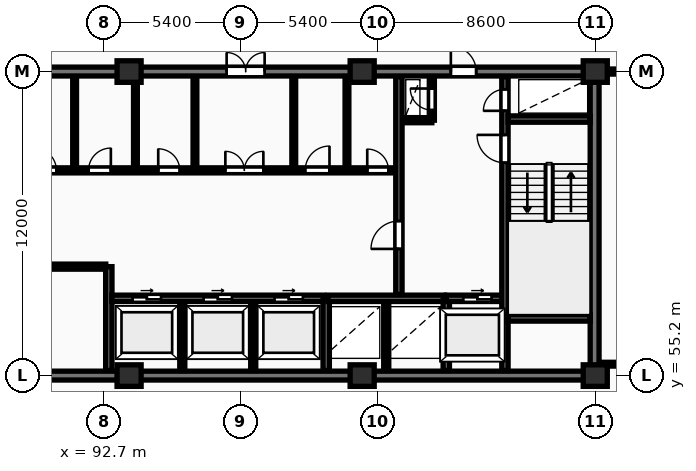
"""IFC4 building model, lengths in metres.
Left out: names, types, materials, properties, quantities, classifications, styles, units other than length and angle.
Written with IfcOpenShell. Run it as: python <this file> out.ifc"""

import sys

from ifc_helpers import new_model, si_unit, direction, frame, frame_2d, origin, origin_2d, place, context, subcontext, project, spatial, rectangle, extrude, element, fill, save


model = new_model("IFC4")
c1 = context("Model", 3, precision=1e-05, world=origin(), true_north=direction((0.0, 1.0)))
c2 = subcontext(c1, "Body", "Model", "MODEL_VIEW")
j1 = project(units=[si_unit("LENGTHUNIT", "METRE"), si_unit("PLANEANGLEUNIT", "RADIAN")], contexts=[c1])
p1 = place(None, origin())
s1 = spatial("IfcSite", under=j1, at=p1, CompositionType="ELEMENT")
p2 = place(p1, origin())
s2 = spatial("IfcBuilding", under=s1, at=p2, CompositionType="ELEMENT")
p3 = place(p2, frame((0.0, 0.0, 100.3)))
s3 = spatial("IfcBuildingStorey", under=s2, at=p3, CompositionType="ELEMENT", Elevation=100.3)
for number, where, z_axis, x_axis in (
    (1, (93.7, 55.2, 0.0), (0.0, 0.0, 1.0), (1.0, 0.0, 0.0)),
    (2, (93.7, 67.2, 0.0), (0.0, 0.0, 1.0), (1.0, 0.0, 0.0)),
    (3, (102.9, 55.2, 0.0), (0.0, 0.0, 1.0), (1.0, 0.0, 0.0)),
    (4, (102.9, 67.2, 0.0), (0.0, 0.0, 1.0), (1.0, 0.0, 0.0)),
    (5, (112.1, 55.2, 0.0), (0.0, 0.0, 1.0), (1.0, 0.0, 0.0)),
    (6, (112.1, 67.2, 0.0), (0.0, 0.0, 1.0), (1.0, 0.0, 0.0)),
):
    element("IfcColumn", number, at=place(p3, frame(where, z_axis=z_axis, x_axis=x_axis)), inside=s3, PredefinedType="COLUMN", context=c2, shape_type="SweptSolid", body=[
        extrude(rectangle(XDim=0.95, YDim=0.85, at=origin_2d()), origin(), (0.0, 0.0, 1.0), 3.25),
    ])
p4 = place(p3, frame((75.95, 55.2, 0.0), z_axis=(0.0, 0.0, 1.0), x_axis=(1.0, 0.0, 0.0)))
e7 = element("IfcWall", 7, at=p4, inside=s3, PredefinedType="SHEAR", context=c2, shape_type="SweptSolid", body=[
    extrude(rectangle(XDim=36.3, YDim=0.35, at=frame_2d((18.15, 0.0))), origin(), (0.0, 0.0, 1.0), 3.25),
])
p5 = place(p3, frame((112.075, 55.375, 0.0), z_axis=(0.0, 0.0, 1.0), x_axis=(0.0, 1.0, 0.0)))
e8 = element("IfcWall", 8, at=p5, inside=s3, PredefinedType="SHEAR", context=c2, shape_type="SweptSolid", body=[
    extrude(rectangle(XDim=11.65, YDim=0.35, at=frame_2d((5.825, 0.0))), origin(), (0.0, 0.0, 1.0), 3.25),
])
p6 = place(p3, frame((75.95, 67.2, 0.0), z_axis=(0.0, 0.0, 1.0), x_axis=(1.0, 0.0, 0.0)))
e9 = element("IfcWall", 9, at=p6, inside=s3, PredefinedType="SHEAR", context=c2, shape_type="SweptSolid", body=[
    extrude(rectangle(XDim=36.3, YDim=0.35, at=frame_2d((18.15, 0.0))), origin(), (0.0, 0.0, 1.0), 3.25),
])
p7 = place(p6, frame((5.25, 0.0, 0.0)))
e10 = element("IfcOpeningElement", 10, at=p7, cuts=e9, PredefinedType="OPENING", context=c2, shape_type="SweptSolid", body=[
    extrude(rectangle(XDim=1.0, YDim=2.15, at=frame_2d((0.5, 1.075))), frame((0.0, 0.185, 0.0), z_axis=(0.0, -1.0, 0.0), x_axis=(1.0, 0.0, 0.0)), (0.0, 0.0, 1.0), 0.37),
])
p8 = place(p6, frame((21.6, 0.0, 0.0)))
e11 = element("IfcOpeningElement", 11, at=p8, cuts=e9, PredefinedType="OPENING", context=c2, shape_type="SweptSolid", body=[
    extrude(rectangle(XDim=1.5, YDim=2.2, at=frame_2d((0.75, 1.1))), frame((0.0, 0.185, 0.0), z_axis=(0.0, -1.0, 0.0), x_axis=(1.0, 0.0, 0.0)), (0.0, 0.0, 1.0), 0.37),
])
p9 = place(p6, frame((30.45, 0.0, 0.0)))
e12 = element("IfcOpeningElement", 12, at=p9, cuts=e9, PredefinedType="OPENING", context=c2, shape_type="SweptSolid", body=[
    extrude(rectangle(XDim=1.0, YDim=2.15, at=frame_2d((0.5, 1.075))), frame((0.0, 0.185, 0.0), z_axis=(0.0, -1.0, 0.0), x_axis=(1.0, 0.0, 0.0)), (0.0, 0.0, 1.0), 0.37),
])
p10 = place(p3, frame((84.42, 59.5, 0.0), z_axis=(0.0, 0.0, 1.0), x_axis=(1.0, 0.0, 0.0)))
e13 = element("IfcWall", 13, at=p10, inside=s3, PredefinedType="PARTITIONING", context=c2, shape_type="SweptSolid", body=[
    extrude(rectangle(XDim=8.36, YDim=0.2, at=frame_2d((4.18, 0.0))), origin(), (0.0, 0.0, 1.0), 2.97),
])
p11 = place(p10, frame((3.4, 0.0, 0.0)))
e14 = element("IfcOpeningElement", 14, at=p11, cuts=e13, PredefinedType="OPENING", context=c2, shape_type="SweptSolid", body=[
    extrude(rectangle(XDim=0.92, YDim=2.08, at=frame_2d((0.46, 1.04))), frame((0.0, 0.11, 0.0), z_axis=(0.0, -1.0, 0.0), x_axis=(1.0, 0.0, 0.0)), (0.0, 0.0, 1.0), 0.22),
])
p12 = place(p3, frame((92.9, 55.4, 0.0), z_axis=(0.0, 0.0, 1.0), x_axis=(0.0, 1.0, 0.0)))
e15 = element("IfcWall", 15, at=p12, inside=s3, PredefinedType="SHEAR", context=c2, shape_type="SweptSolid", body=[
    extrude(rectangle(XDim=4.1, YDim=0.25, at=frame_2d((2.05, 0.0))), origin(), (0.0, 0.0, 1.0), 3.25),
])
for number, where, z_axis, x_axis in (
    (16, (95.8, 55.4, 0.0), (0.0, 0.0, 1.0), (0.0, 1.0, 0.0)),
    (17, (98.6, 55.4, 0.0), (0.0, 0.0, 1.0), (0.0, 1.0, 0.0)),
):
    element("IfcWall", number, at=place(p3, frame(where, z_axis=z_axis, x_axis=x_axis)), inside=s3, PredefinedType="PARTITIONING", context=c2, shape_type="SweptSolid", body=[
        extrude(rectangle(XDim=2.72, YDim=0.2, at=frame_2d((1.36, 0.0))), origin(), (0.0, 0.0, 1.0), 2.97),
    ])
p13 = place(p3, frame((93.02, 58.25, 0.0), z_axis=(0.0, 0.0, 1.0), x_axis=(1.0, 0.0, 0.0)))
e18 = element("IfcWall", 18, at=p13, inside=s3, PredefinedType="SHEAR", context=c2, shape_type="SweptSolid", body=[
    extrude(rectangle(XDim=8.36, YDim=0.25, at=frame_2d((4.18, 0.0))), origin(), (0.0, 0.0, 1.0), 3.25),
])
p14 = place(p13, frame((0.82, 0.0, 0.0)))
e19 = element("IfcOpeningElement", 19, at=p14, cuts=e18, PredefinedType="OPENING", context=c2, shape_type="SweptSolid", body=[
    extrude(rectangle(XDim=1.12, YDim=2.12, at=frame_2d((0.56, 1.06))), frame((0.0, 0.135, 0.0), z_axis=(0.0, -1.0, 0.0), x_axis=(1.0, 0.0, 0.0)), (0.0, 0.0, 1.0), 0.27),
])
p15 = place(p13, frame((3.62, 0.0, 0.0)))
e20 = element("IfcOpeningElement", 20, at=p15, cuts=e18, PredefinedType="OPENING", context=c2, shape_type="SweptSolid", body=[
    extrude(rectangle(XDim=1.12, YDim=2.12, at=frame_2d((0.56, 1.06))), frame((0.0, 0.135, 0.0), z_axis=(0.0, -1.0, 0.0), x_axis=(1.0, 0.0, 0.0)), (0.0, 0.0, 1.0), 0.27),
])
p16 = place(p13, frame((6.42, 0.0, 0.0)))
e21 = element("IfcOpeningElement", 21, at=p16, cuts=e18, PredefinedType="OPENING", context=c2, shape_type="SweptSolid", body=[
    extrude(rectangle(XDim=1.12, YDim=2.12, at=frame_2d((0.56, 1.06))), frame((0.0, 0.135, 0.0), z_axis=(0.0, -1.0, 0.0), x_axis=(1.0, 0.0, 0.0)), (0.0, 0.0, 1.0), 0.27),
])
p17 = place(p3, frame((101.48, 55.4, 0.0), z_axis=(0.0, 0.0, 1.0), x_axis=(0.0, 1.0, 0.0)))
e22 = element("IfcWall", 22, at=p17, inside=s3, PredefinedType="SHEAR", context=c2, shape_type="SweptSolid", body=[
    extrude(rectangle(XDim=2.85, YDim=0.25, at=frame_2d((1.425, 0.0))), origin(), (0.0, 0.0, 1.0), 3.25),
])
p18 = place(p3, frame((103.85, 55.4, 0.0), z_axis=(0.0, 0.0, 1.0), x_axis=(0.0, 1.0, 0.0)))
e23 = element("IfcWall", 23, at=p18, inside=s3, PredefinedType="PARTITIONING", context=c2, shape_type="SweptSolid", body=[
    extrude(rectangle(XDim=2.72, YDim=0.2, at=frame_2d((1.36, 0.0))), origin(), (0.0, 0.0, 1.0), 2.97),
])
p19 = place(p3, frame((101.55, 58.25, 0.0), z_axis=(0.0, 0.0, 1.0), x_axis=(1.0, 0.0, 0.0)))
e24 = element("IfcWall", 24, at=p19, inside=s3, PredefinedType="SHEAR", context=c2, shape_type="SweptSolid", body=[
    extrude(rectangle(XDim=4.6, YDim=0.25, at=frame_2d((2.3, 0.0))), origin(), (0.0, 0.0, 1.0), 3.25),
])
p20 = place(p3, frame((106.22, 55.4, 0.0), z_axis=(0.0, 0.0, 1.0), x_axis=(0.0, 1.0, 0.0)))
e25 = element("IfcWall", 25, at=p20, inside=s3, PredefinedType="SHEAR", context=c2, shape_type="SweptSolid", body=[
    extrude(rectangle(XDim=2.85, YDim=0.25, at=frame_2d((1.425, 0.0))), origin(), (0.0, 0.0, 1.0), 3.25),
])
p21 = place(p3, frame((106.22, 58.25, 0.0), z_axis=(0.0, 0.0, 1.0), x_axis=(1.0, 0.0, 0.0)))
e26 = element("IfcWall", 26, at=p21, inside=s3, PredefinedType="SHEAR", context=c2, shape_type="SweptSolid", body=[
    extrude(rectangle(XDim=2.46, YDim=0.25, at=frame_2d((1.23, 0.0))), origin(), (0.0, 0.0, 1.0), 3.25),
])
p22 = place(p21, frame((0.67, 0.0, 0.0)))
e27 = element("IfcOpeningElement", 27, at=p22, cuts=e26, PredefinedType="OPENING", context=c2, shape_type="SweptSolid", body=[
    extrude(rectangle(XDim=1.12, YDim=2.12, at=frame_2d((0.56, 1.06))), frame((0.0, 0.135, 0.0), z_axis=(0.0, -1.0, 0.0), x_axis=(1.0, 0.0, 0.0)), (0.0, 0.0, 1.0), 0.27),
])
p23 = place(p3, frame((91.55, 63.4, 0.0), z_axis=(0.0, 0.0, 1.0), x_axis=(0.0, 1.0, 0.0)))
e28 = element("IfcWall", 28, at=p23, inside=s3, PredefinedType="PARTITIONING", context=c2, shape_type="SweptSolid", body=[
    extrude(rectangle(XDim=3.6, YDim=0.15, at=frame_2d((1.8, 0.0))), origin(), (0.0, 0.0, 1.0), 2.97),
])
p24 = place(p3, frame((93.95, 63.4, 0.0), z_axis=(0.0, 0.0, 1.0), x_axis=(0.0, 1.0, 0.0)))
e29 = element("IfcWall", 29, at=p24, inside=s3, PredefinedType="PARTITIONING", context=c2, shape_type="SweptSolid", body=[
    extrude(rectangle(XDim=3.6, YDim=0.15, at=frame_2d((1.8, 0.0))), origin(), (0.0, 0.0, 1.0), 2.277),
])
for number, where, z_axis, x_axis in (
    (30, (102.3, 63.4, 0.0), (0.0, 0.0, 1.0), (0.0, 1.0, 0.0)),
    (31, (96.3, 63.4, 0.0), (0.0, 0.0, 1.0), (0.0, 1.0, 0.0)),
    (32, (100.2, 63.4, 0.0), (0.0, 0.0, 1.0), (0.0, 1.0, 0.0)),
):
    element("IfcWall", number, at=place(p3, frame(where, z_axis=z_axis, x_axis=x_axis)), inside=s3, PredefinedType="PARTITIONING", context=c2, shape_type="SweptSolid", body=[
        extrude(rectangle(XDim=3.6, YDim=0.15, at=frame_2d((1.8, 0.0))), origin(), (0.0, 0.0, 1.0), 2.97),
    ])
p25 = place(p3, frame((84.42, 63.3, 0.0), z_axis=(0.0, 0.0, 1.0), x_axis=(1.0, 0.0, 0.0)))
e33 = element("IfcWall", 33, at=p25, inside=s3, PredefinedType="PARTITIONING", context=c2, shape_type="SweptSolid", body=[
    extrude(rectangle(XDim=19.83, YDim=0.2, at=frame_2d((9.915, 0.0))), origin(), (0.0, 0.0, 1.0), 2.97),
])
p26 = place(p25, frame((1.15, 0.0, 0.0)))
e34 = element("IfcOpeningElement", 34, at=p26, cuts=e33, PredefinedType="OPENING", context=c2, shape_type="SweptSolid", body=[
    extrude(rectangle(XDim=0.85, YDim=2.05, at=frame_2d((0.425, 1.025))), frame((0.0, 0.11, 0.0), z_axis=(0.0, -1.0, 0.0), x_axis=(1.0, 0.0, 0.0)), (0.0, 0.0, 1.0), 0.22),
])
p27 = place(p25, frame((3.25, 0.0, 0.0)))
e35 = element("IfcOpeningElement", 35, at=p27, cuts=e33, PredefinedType="OPENING", context=c2, shape_type="SweptSolid", body=[
    extrude(rectangle(XDim=0.85, YDim=2.05, at=frame_2d((0.425, 1.025))), frame((0.0, 0.11, 0.0), z_axis=(0.0, -1.0, 0.0), x_axis=(1.0, 0.0, 0.0)), (0.0, 0.0, 1.0), 0.22),
])
p28 = place(p25, frame((13.08, 0.0, 0.0)))
e36 = element("IfcOpeningElement", 36, at=p28, cuts=e33, PredefinedType="OPENING", context=c2, shape_type="SweptSolid", body=[
    extrude(rectangle(XDim=1.5, YDim=2.2, at=frame_2d((0.75, 1.1))), frame((0.0, 0.11, 0.0), z_axis=(0.0, -1.0, 0.0), x_axis=(1.0, 0.0, 0.0)), (0.0, 0.0, 1.0), 0.22),
])
p29 = place(p25, frame((5.53, 0.0, 0.0)))
e37 = element("IfcOpeningElement", 37, at=p29, cuts=e33, PredefinedType="OPENING", context=c2, shape_type="SweptSolid", body=[
    extrude(rectangle(XDim=0.88, YDim=2.06, at=frame_2d((0.44, 1.03))), frame((0.0, 0.11, 0.0), z_axis=(0.0, -1.0, 0.0), x_axis=(1.0, 0.0, 0.0)), (0.0, 0.0, 1.0), 0.22),
])
p30 = place(p25, frame((7.68, 0.0, 0.0)))
e38 = element("IfcOpeningElement", 38, at=p30, cuts=e33, PredefinedType="OPENING", context=c2, shape_type="SweptSolid", body=[
    extrude(rectangle(XDim=0.88, YDim=2.06, at=frame_2d((0.44, 1.03))), frame((0.0, 0.11, 0.0), z_axis=(0.0, -1.0, 0.0), x_axis=(1.0, 0.0, 0.0)), (0.0, 0.0, 1.0), 0.22),
])
p31 = place(p25, frame((10.43, 0.0, 0.0)))
e39 = element("IfcOpeningElement", 39, at=p31, cuts=e33, PredefinedType="OPENING", context=c2, shape_type="SweptSolid", body=[
    extrude(rectangle(XDim=0.85, YDim=2.05, at=frame_2d((0.425, 1.025))), frame((0.0, 0.11, 0.0), z_axis=(0.0, -1.0, 0.0), x_axis=(1.0, 0.0, 0.0)), (0.0, 0.0, 1.0), 0.22),
])
p32 = place(p25, frame((16.23, 0.0, 0.0)))
e40 = element("IfcOpeningElement", 40, at=p32, cuts=e33, PredefinedType="OPENING", context=c2, shape_type="SweptSolid", body=[
    extrude(rectangle(XDim=0.96, YDim=2.1, at=frame_2d((0.48, 1.05))), frame((0.0, 0.11, 0.0), z_axis=(0.0, -1.0, 0.0), x_axis=(1.0, 0.0, 0.0)), (0.0, 0.0, 1.0), 0.22),
])
p33 = place(p25, frame((18.68, 0.0, 0.0)))
e41 = element("IfcOpeningElement", 41, at=p33, cuts=e33, PredefinedType="OPENING", context=c2, shape_type="SweptSolid", body=[
    extrude(rectangle(XDim=0.84, YDim=2.04, at=frame_2d((0.42, 1.02))), frame((0.0, 0.11, 0.0), z_axis=(0.0, -1.0, 0.0), x_axis=(1.0, 0.0, 0.0)), (0.0, 0.0, 1.0), 0.22),
])
p34 = place(p3, frame((104.45, 65.28, 0.0), z_axis=(0.0, 0.0, 1.0), x_axis=(1.0, 0.0, 0.0)))
e42 = element("IfcWall", 42, at=p34, inside=s3, PredefinedType="PARTITIONING", context=c2, shape_type="SweptSolid", body=[
    extrude(rectangle(XDim=1.2, YDim=0.2, at=frame_2d((0.6, 0.0))), origin(), (0.0, 0.0, 1.0), 2.97),
])
p35 = place(p3, frame((105.65, 65.28, 0.0), z_axis=(0.0, 0.0, 1.0), x_axis=(0.0, 1.0, 0.0)))
e43 = element("IfcWall", 43, at=p35, inside=s3, PredefinedType="PARTITIONING", context=c2, shape_type="SweptSolid", body=[
    extrude(rectangle(XDim=1.72, YDim=0.2, at=frame_2d((0.86, 0.0))), origin(), (0.0, 0.0, 1.0), 2.97),
])
p36 = place(p35, frame((0.4, 0.0, 0.0)))
e44 = element("IfcOpeningElement", 44, at=p36, cuts=e43, PredefinedType="OPENING", context=c2, shape_type="SweptSolid", body=[
    extrude(rectangle(XDim=0.85, YDim=2.05, at=frame_2d((0.425, 1.025))), frame((0.0, 0.11, 0.0), z_axis=(0.0, -1.0, 0.0), x_axis=(1.0, 0.0, 0.0)), (0.0, 0.0, 1.0), 0.22),
])
p37 = place(p3, frame((104.35, 58.4, 0.0), z_axis=(0.0, 0.0, 1.0), x_axis=(0.0, 1.0, 0.0)))
e45 = element("IfcWall", 45, at=p37, inside=s3, PredefinedType="SHEAR", context=c2, shape_type="SweptSolid", body=[
    extrude(rectangle(XDim=8.6, YDim=0.25, at=frame_2d((4.3, 0.0))), origin(), (0.0, 0.0, 1.0), 3.25),
])
p38 = place(p37, frame((1.8, 0.0, 0.0)))
e46 = element("IfcOpeningElement", 46, at=p38, cuts=e45, PredefinedType="OPENING", context=c2, shape_type="SweptSolid", body=[
    extrude(rectangle(XDim=1.1, YDim=2.1, at=frame_2d((0.55, 1.05))), frame((0.0, 0.135, 0.0), z_axis=(0.0, -1.0, 0.0), x_axis=(1.0, 0.0, 0.0)), (0.0, 0.0, 1.0), 0.27),
])
p39 = place(p3, frame((108.535, 55.4, 0.0), z_axis=(0.0, 0.0, 1.0), x_axis=(0.0, 1.0, 0.0)))
e47 = element("IfcWall", 47, at=p39, inside=s3, PredefinedType="SHEAR", context=c2, shape_type="SweptSolid", body=[
    extrude(rectangle(XDim=11.6, YDim=0.25, at=frame_2d((5.8, 0.0))), origin(), (0.0, 0.0, 1.0), 3.25),
])
p40 = place(p39, frame((8.2, 0.0, 0.0)))
e48 = element("IfcOpeningElement", 48, at=p40, cuts=e47, PredefinedType="OPENING", context=c2, shape_type="SweptSolid", body=[
    extrude(rectangle(XDim=1.1, YDim=2.1, at=frame_2d((0.55, 1.05))), frame((0.0, 0.135, 0.0), z_axis=(0.0, -1.0, 0.0), x_axis=(1.0, 0.0, 0.0)), (0.0, 0.0, 1.0), 0.27),
])
p41 = place(p39, frame((10.25, 0.0, 0.0)))
e49 = element("IfcOpeningElement", 49, at=p41, cuts=e47, PredefinedType="OPENING", context=c2, shape_type="SweptSolid", body=[
    extrude(rectangle(XDim=0.85, YDim=2.05, at=frame_2d((0.425, 1.025))), frame((0.0, 0.135, 0.0), z_axis=(0.0, -1.0, 0.0), x_axis=(1.0, 0.0, 0.0)), (0.0, 0.0, 1.0), 0.27),
])
for number, where, z_axis, x_axis in (
    (50, (108.66, 57.475, 0.0), (0.0, 0.0, 1.0), (1.0, 0.0, 0.0)),
    (51, (108.66, 65.325, 0.0), (0.0, 0.0, 1.0), (1.0, 0.0, 0.0)),
):
    element("IfcWall", number, at=place(p3, frame(where, z_axis=z_axis, x_axis=x_axis)), inside=s3, PredefinedType="SHEAR", context=c2, shape_type="SweptSolid", body=[
        extrude(rectangle(XDim=3.24, YDim=0.25, at=frame_2d((1.62, 0.0))), origin(), (0.0, 0.0, 1.0), 3.25),
    ])
p42 = place(p3, frame((112.27, 55.65, 0.0), z_axis=(0.0, 0.0, 1.0), x_axis=(1.0, 0.0, 0.0)))
e52 = element("IfcWall", 52, at=p42, inside=s3, PredefinedType="PARTITIONING", context=c2, shape_type="SweptSolid", body=[
    extrude(rectangle(XDim=6.76, YDim=0.15, at=frame_2d((3.38, 0.0))), origin(), (0.0, 0.0, 1.0), 2.97),
])
p43 = place(p42, frame((1.64, 0.0, 0.0)))
e53 = element("IfcOpeningElement", 53, at=p43, cuts=e52, PredefinedType="OPENING", context=c2, shape_type="SweptSolid", body=[
    extrude(rectangle(XDim=0.84, YDim=2.04, at=frame_2d((0.42, 1.02))), frame((0.0, 0.085, 0.0), z_axis=(0.0, -1.0, 0.0), x_axis=(1.0, 0.0, 0.0)), (0.0, 0.0, 1.0), 0.17),
])
p44 = place(p42, frame((3.16, 0.0, 0.0)))
e54 = element("IfcOpeningElement", 54, at=p44, cuts=e52, PredefinedType="OPENING", context=c2, shape_type="SweptSolid", body=[
    extrude(rectangle(XDim=0.88, YDim=2.06, at=frame_2d((0.44, 1.03))), frame((0.0, 0.085, 0.0), z_axis=(0.0, -1.0, 0.0), x_axis=(1.0, 0.0, 0.0)), (0.0, 0.0, 1.0), 0.17),
])
p45 = place(p3, frame((112.25, 67.2, 0.0), z_axis=(0.0, 0.0, 1.0), x_axis=(1.0, 0.0, 0.0)))
e55 = element("IfcWall", 55, at=p45, inside=s3, PredefinedType="PARTITIONING", context=c2, shape_type="SweptSolid", body=[
    extrude(rectangle(XDim=18.35, YDim=0.2, at=frame_2d((9.175, 0.0))), origin(), (0.0, 0.0, 1.0), 2.433),
])
p46 = place(p45, frame((1.58, 0.0, 0.0)))
e56 = element("IfcOpeningElement", 56, at=p46, cuts=e55, PredefinedType="OPENING", context=c2, shape_type="SweptSolid", body=[
    extrude(rectangle(XDim=0.95, YDim=2.15, at=frame_2d((0.475, 1.075))), frame((0.0, 0.11, 0.0), z_axis=(0.0, -1.0, 0.0), x_axis=(1.0, 0.0, 0.0)), (0.0, 0.0, 1.0), 0.22),
])
p47 = place(p8, origin())
e57 = element("IfcDoor", 57, at=p47, inside=s3, OperationType="DOUBLE_DOOR_SINGLE_SWING", PredefinedType="DOOR", context=c2, shape_type="SweptSolid", body=[
    extrude(rectangle(XDim=1.5, YDim=2.2, at=frame_2d((0.75, 1.1))), frame((0.0, 0.025, 0.0), z_axis=(0.0, -1.0, 0.0), x_axis=(1.0, 0.0, 0.0)), (0.0, 0.0, 1.0), 0.05),
])
fill(e11, e57)
p48 = place(p9, origin())
e58 = element("IfcDoor", 58, at=p48, inside=s3, OperationType="SINGLE_SWING_LEFT", PredefinedType="DOOR", context=c2, shape_type="SweptSolid", body=[
    extrude(rectangle(XDim=1.0, YDim=2.15, at=frame_2d((0.5, 1.075))), frame((0.0, 0.025, 0.0), z_axis=(0.0, -1.0, 0.0), x_axis=(1.0, 0.0, 0.0)), (0.0, 0.0, 1.0), 0.05),
])
fill(e12, e58)
p49 = place(p14, origin())
e59 = element("IfcDoor", 59, at=p49, inside=s3, OperationType="SLIDING_TO_RIGHT", PredefinedType="DOOR", context=c2, shape_type="SweptSolid", body=[
    extrude(rectangle(XDim=1.12, YDim=2.12, at=frame_2d((0.56, 1.06))), frame((0.0, 0.025, 0.0), z_axis=(0.0, -1.0, 0.0), x_axis=(1.0, 0.0, 0.0)), (0.0, 0.0, 1.0), 0.05),
])
fill(e19, e59)
p50 = place(p15, origin())
e60 = element("IfcDoor", 60, at=p50, inside=s3, OperationType="SLIDING_TO_RIGHT", PredefinedType="DOOR", context=c2, shape_type="SweptSolid", body=[
    extrude(rectangle(XDim=1.12, YDim=2.12, at=frame_2d((0.56, 1.06))), frame((0.0, 0.025, 0.0), z_axis=(0.0, -1.0, 0.0), x_axis=(1.0, 0.0, 0.0)), (0.0, 0.0, 1.0), 0.05),
])
fill(e20, e60)
p51 = place(p16, origin())
e61 = element("IfcDoor", 61, at=p51, inside=s3, OperationType="SLIDING_TO_RIGHT", PredefinedType="DOOR", context=c2, shape_type="SweptSolid", body=[
    extrude(rectangle(XDim=1.12, YDim=2.12, at=frame_2d((0.56, 1.06))), frame((0.0, 0.025, 0.0), z_axis=(0.0, -1.0, 0.0), x_axis=(1.0, 0.0, 0.0)), (0.0, 0.0, 1.0), 0.05),
])
fill(e21, e61)
p52 = place(p22, origin())
e62 = element("IfcDoor", 62, at=p52, inside=s3, OperationType="SLIDING_TO_RIGHT", PredefinedType="DOOR", context=c2, shape_type="SweptSolid", body=[
    extrude(rectangle(XDim=1.12, YDim=2.12, at=frame_2d((0.56, 1.06))), frame((0.0, 0.025, 0.0), z_axis=(0.0, -1.0, 0.0), x_axis=(1.0, 0.0, 0.0)), (0.0, 0.0, 1.0), 0.05),
])
fill(e27, e62)
p53 = place(p28, origin())
e63 = element("IfcDoor", 63, at=p53, inside=s3, OperationType="DOUBLE_DOOR_SINGLE_SWING", PredefinedType="DOOR", context=c2, shape_type="SweptSolid", body=[
    extrude(rectangle(XDim=1.5, YDim=2.2, at=frame_2d((0.75, 1.1))), frame((0.0, 0.025, 0.0), z_axis=(0.0, -1.0, 0.0), x_axis=(1.0, 0.0, 0.0)), (0.0, 0.0, 1.0), 0.05),
])
fill(e36, e63)
p54 = place(p29, origin())
e64 = element("IfcDoor", 64, at=p54, inside=s3, OperationType="SINGLE_SWING_LEFT", PredefinedType="DOOR", context=c2, shape_type="SweptSolid", body=[
    extrude(rectangle(XDim=0.88, YDim=2.06, at=frame_2d((0.44, 1.03))), frame((0.0, 0.025, 0.0), z_axis=(0.0, -1.0, 0.0), x_axis=(1.0, 0.0, 0.0)), (0.0, 0.0, 1.0), 0.05),
])
fill(e37, e64)
p55 = place(p30, origin())
e65 = element("IfcDoor", 65, at=p55, inside=s3, OperationType="SINGLE_SWING_RIGHT", PredefinedType="DOOR", context=c2, shape_type="SweptSolid", body=[
    extrude(rectangle(XDim=0.88, YDim=2.06, at=frame_2d((0.44, 1.03))), frame((0.0, 0.025, 0.0), z_axis=(0.0, -1.0, 0.0), x_axis=(1.0, 0.0, 0.0)), (0.0, 0.0, 1.0), 0.05),
])
fill(e38, e65)
p56 = place(p31, origin())
e66 = element("IfcDoor", 66, at=p56, inside=s3, OperationType="SINGLE_SWING_LEFT", PredefinedType="DOOR", context=c2, shape_type="SweptSolid", body=[
    extrude(rectangle(XDim=0.85, YDim=2.05, at=frame_2d((0.425, 1.025))), frame((0.0, 0.025, 0.0), z_axis=(0.0, -1.0, 0.0), x_axis=(1.0, 0.0, 0.0)), (0.0, 0.0, 1.0), 0.05),
])
fill(e39, e66)
p57 = place(p32, origin())
e67 = element("IfcDoor", 67, at=p57, inside=s3, OperationType="SINGLE_SWING_RIGHT", PredefinedType="DOOR", context=c2, shape_type="SweptSolid", body=[
    extrude(rectangle(XDim=0.96, YDim=2.1, at=frame_2d((0.48, 1.05))), frame((0.0, 0.025, 0.0), z_axis=(0.0, -1.0, 0.0), x_axis=(1.0, 0.0, 0.0)), (0.0, 0.0, 1.0), 0.05),
])
fill(e40, e67)
p58 = place(p33, origin())
e68 = element("IfcDoor", 68, at=p58, inside=s3, OperationType="SINGLE_SWING_LEFT", PredefinedType="DOOR", context=c2, shape_type="SweptSolid", body=[
    extrude(rectangle(XDim=0.84, YDim=2.04, at=frame_2d((0.42, 1.02))), frame((0.0, 0.025, 0.0), z_axis=(0.0, -1.0, 0.0), x_axis=(1.0, 0.0, 0.0)), (0.0, 0.0, 1.0), 0.05),
])
fill(e41, e68)
p59 = place(p36, origin())
e69 = element("IfcDoor", 69, at=p59, inside=s3, OperationType="SINGLE_SWING_RIGHT", PredefinedType="DOOR", context=c2, shape_type="SweptSolid", body=[
    extrude(rectangle(XDim=0.85, YDim=2.05, at=frame_2d((0.425, 1.025))), frame((0.0, 0.025, 0.0), z_axis=(0.0, -1.0, 0.0), x_axis=(1.0, 0.0, 0.0)), (0.0, 0.0, 1.0), 0.05),
])
fill(e44, e69)
p60 = place(p38, origin())
e70 = element("IfcDoor", 70, at=p60, inside=s3, OperationType="SINGLE_SWING_LEFT", PredefinedType="DOOR", context=c2, shape_type="SweptSolid", body=[
    extrude(rectangle(XDim=1.1, YDim=2.1, at=frame_2d((0.55, 1.05))), frame((0.0, 0.025, 0.0), z_axis=(0.0, -1.0, 0.0), x_axis=(1.0, 0.0, 0.0)), (0.0, 0.0, 1.0), 0.05),
])
fill(e46, e70)
p61 = place(p40, origin())
e71 = element("IfcDoor", 71, at=p61, inside=s3, OperationType="SINGLE_SWING_RIGHT", PredefinedType="DOOR", context=c2, shape_type="SweptSolid", body=[
    extrude(rectangle(XDim=1.1, YDim=2.1, at=frame_2d((0.55, 1.05))), frame((0.0, 0.025, 0.0), z_axis=(0.0, -1.0, 0.0), x_axis=(1.0, 0.0, 0.0)), (0.0, 0.0, 1.0), 0.05),
])
fill(e48, e71)
p62 = place(p41, origin())
e72 = element("IfcDoor", 72, at=p62, inside=s3, OperationType="SINGLE_SWING_LEFT", PredefinedType="DOOR", context=c2, shape_type="SweptSolid", body=[
    extrude(rectangle(XDim=0.85, YDim=2.05, at=frame_2d((0.425, 1.025))), frame((0.0, 0.025, 0.0), z_axis=(0.0, -1.0, 0.0), x_axis=(1.0, 0.0, 0.0)), (0.0, 0.0, 1.0), 0.05),
])
fill(e49, e72)
save(model, sys.argv[1])
